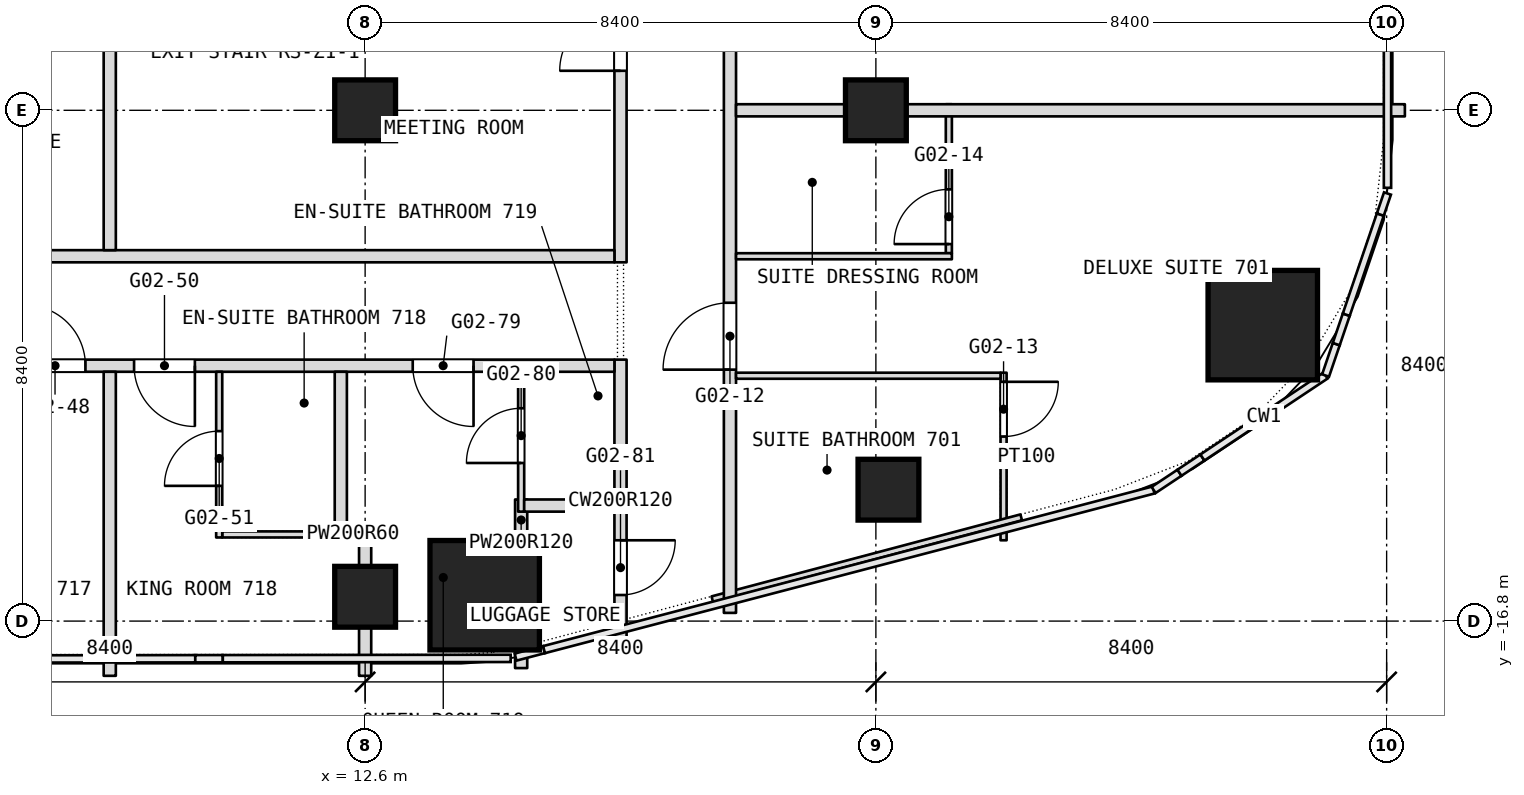
"""IFC4 building model, lengths in metres.
Left out: names, types, materials, properties, quantities, classifications, styles, units other than length and angle.
Written with IfcOpenShell. Run it as: python <this file> out.ifc"""

import sys

from ifc_helpers import new_model, si_unit, direction, frame, frame_2d, origin, origin_2d, place, context, subcontext, project, spatial, rectangle, extrude, element, fill, save


model = new_model("IFC4")
c1 = context("Model", 3, precision=1e-05, world=origin(), true_north=direction((0.0, 1.0)))
c2 = subcontext(c1, "Body", "Model", "MODEL_VIEW")
j1 = project(units=[si_unit("LENGTHUNIT", "METRE"), si_unit("PLANEANGLEUNIT", "RADIAN")], contexts=[c1])
p1 = place(None, origin())
s1 = spatial("IfcSite", under=j1, at=p1, CompositionType="ELEMENT")
p2 = place(p1, origin())
s2 = spatial("IfcBuilding", under=s1, at=p2, CompositionType="ELEMENT")
p3 = place(p2, frame((0.0, 0.0, 40.1)))
s3 = spatial("IfcBuildingStorey", under=s2, at=p3, CompositionType="ELEMENT", Elevation=40.1)
for number, where, z_axis, x_axis in (
    (1, (14.566, -16.375, 0.0), (0.0, 0.0, 1.0), (1.0, 0.0, 0.0)),
    (2, (27.363, -11.933, 0.0), (0.0, 0.0, 1.0), (1.0, 0.0, 0.0)),
):
    element("IfcColumn", number, at=place(p3, frame(where, z_axis=z_axis, x_axis=x_axis)), inside=s3, PredefinedType="COLUMN", context=c2, shape_type="SweptSolid", body=[
        extrude(rectangle(XDim=1.8, YDim=1.8, at=origin_2d()), origin(), (0.0, 0.0, 1.0), 3.6),
    ])
for number, where, z_axis, x_axis in (
    (3, (12.6, -8.4, 0.0), (0.0, 0.0, 1.0), (1.0, 0.0, 0.0)),
    (4, (21.0, -8.4, 0.0), (0.0, 0.0, 1.0), (1.0, 0.0, 0.0)),
    (5, (21.207, -14.639, 0.0), (0.0, 0.0, 1.0), (1.0, 0.0, 0.0)),
    (6, (12.6, -16.4, 0.0), (0.0, 0.0, 1.0), (1.0, 0.0, 0.0)),
):
    element("IfcColumn", number, at=place(p3, frame(where, z_axis=z_axis, x_axis=x_axis)), inside=s3, PredefinedType="COLUMN", context=c2, shape_type="SweptSolid", body=[
        extrude(rectangle(XDim=1.0, YDim=1.0, at=origin_2d()), origin(), (0.0, 0.0, 1.0), 3.6),
    ])
p4 = place(p3, frame((23.1, -15.471, 0.0), z_axis=(0.0, 0.0, 1.0), x_axis=(0.0, 1.0, 0.0)))
e7 = element("IfcWall", 7, at=p4, inside=s3, PredefinedType="PARTITIONING", context=c2, shape_type="SweptSolid", body=[
    extrude(rectangle(XDim=2.756, YDim=0.1, at=frame_2d((1.378, 0.0))), origin(), (0.0, 0.0, 1.0), 3.34),
])
p5 = place(p4, frame((1.706, 0.0, 0.0)))
e8 = element("IfcOpeningElement", 8, at=p5, cuts=e7, PredefinedType="OPENING", context=c2, shape_type="SweptSolid", body=[
    extrude(rectangle(XDim=0.9, YDim=2.1, at=frame_2d((0.45, 1.05))), frame((0.0, 0.05, 0.0), z_axis=(0.0, -1.0, 0.0), x_axis=(1.0, 0.0, 0.0)), (0.0, 0.0, 1.0), 0.1),
])
p6 = place(p3, frame((22.2, -10.75, 0.0), z_axis=(0.0, 0.0, 1.0), x_axis=(0.0, 1.0, 0.0)))
e9 = element("IfcWall", 9, at=p6, inside=s3, PredefinedType="PARTITIONING", context=c2, shape_type="SweptSolid", body=[
    extrude(rectangle(XDim=2.45, YDim=0.1, at=frame_2d((1.225, 0.0))), origin(), (0.0, 0.0, 1.0), 3.34),
])
p7 = place(p6, frame((0.15, 0.0, 0.0)))
e10 = element("IfcOpeningElement", 10, at=p7, cuts=e9, PredefinedType="OPENING", context=c2, shape_type="SweptSolid", body=[
    extrude(rectangle(XDim=0.9, YDim=2.1, at=frame_2d((0.45, 1.05))), frame((0.0, 0.05, 0.0), z_axis=(0.0, -1.0, 0.0), x_axis=(1.0, 0.0, 0.0)), (0.0, 0.0, 1.0), 0.1),
])
p8 = place(p3, frame((18.31, -16.442, 0.0), z_axis=(0.0, 0.0, 1.0), x_axis=(0.966552628131, 0.256468354876, 0.0)))
e11 = element("IfcWall", 11, at=p8, inside=s3, PredefinedType="PARTITIONING", context=c2, shape_type="SweptSolid", body=[
    extrude(rectangle(XDim=5.256, YDim=0.1, at=frame_2d((2.628, 0.0))), origin(), (0.0, 0.0, 1.0), 3.34),
])
p9 = place(p3, frame((18.6, -16.665, 0.0), z_axis=(0.0, 0.0, 1.0), x_axis=(0.0, 1.0, 0.0)))
e12 = element("IfcWall", 12, at=p9, inside=s3, PredefinedType="PARTITIONING", context=c2, shape_type="SweptSolid", body=[
    extrude(rectangle(XDim=50.205, YDim=0.2, at=frame_2d((25.103, 0.0))), origin(), (0.0, 0.0, 1.0), 3.34),
])
p10 = place(p9, frame((4.0, 0.0, 0.0)))
e13 = element("IfcOpeningElement", 13, at=p10, cuts=e12, PredefinedType="OPENING", context=c2, shape_type="SweptSolid", body=[
    extrude(rectangle(XDim=1.1, YDim=2.1, at=frame_2d((0.55, 1.05))), frame((0.0, 0.1, 0.0), z_axis=(0.0, -1.0, 0.0), x_axis=(1.0, 0.0, 0.0)), (0.0, 0.0, 1.0), 0.2),
])
p11 = place(p9, frame((9.815, 0.0, 0.0)))
e14 = element("IfcOpeningElement", 14, at=p11, cuts=e12, PredefinedType="OPENING", context=c2, shape_type="SweptSolid", body=[
    extrude(rectangle(XDim=1.1, YDim=2.1, at=frame_2d((0.55, 1.05))), frame((0.0, 0.1, 0.0), z_axis=(0.0, -1.0, 0.0), x_axis=(1.0, 0.0, 0.0)), (0.0, 0.0, 1.0), 0.2),
])
p12 = place(p9, frame((19.965, 0.0, 0.0)))
e15 = element("IfcOpeningElement", 15, at=p12, cuts=e12, PredefinedType="OPENING", context=c2, shape_type="SweptSolid", body=[
    extrude(rectangle(XDim=1.8, YDim=2.1, at=frame_2d((0.9, 1.05))), frame((0.0, 0.1, 0.0), z_axis=(0.0, -1.0, 0.0), x_axis=(1.0, 0.0, 0.0)), (0.0, 0.0, 1.0), 0.2),
])
p13 = place(p9, frame((25.465, 0.0, 0.0)))
e16 = element("IfcOpeningElement", 16, at=p13, cuts=e12, PredefinedType="OPENING", context=c2, shape_type="SweptSolid", body=[
    extrude(rectangle(XDim=1.0, YDim=2.1, at=frame_2d((0.5, 1.05))), frame((0.0, 0.1, 0.0), z_axis=(0.0, -1.0, 0.0), x_axis=(1.0, 0.0, 0.0)), (0.0, 0.0, 1.0), 0.2),
])
p14 = place(p9, frame((32.065, 0.0, 0.0)))
e17 = element("IfcOpeningElement", 17, at=p14, cuts=e12, PredefinedType="OPENING", context=c2, shape_type="SweptSolid", body=[
    extrude(rectangle(XDim=1.0, YDim=2.1, at=frame_2d((0.5, 1.05))), frame((0.0, 0.1, 0.0), z_axis=(0.0, -1.0, 0.0), x_axis=(1.0, 0.0, 0.0)), (0.0, 0.0, 1.0), 0.2),
])
p15 = place(p9, frame((37.165, 0.0, 0.0)))
e18 = element("IfcOpeningElement", 18, at=p15, cuts=e12, PredefinedType="OPENING", context=c2, shape_type="SweptSolid", body=[
    extrude(rectangle(XDim=1.1, YDim=2.1, at=frame_2d((0.55, 1.05))), frame((0.0, 0.1, 0.0), z_axis=(0.0, -1.0, 0.0), x_axis=(1.0, 0.0, 0.0)), (0.0, 0.0, 1.0), 0.2),
])
p16 = place(p9, frame((42.265, 0.0, 0.0)))
e19 = element("IfcOpeningElement", 19, at=p16, cuts=e12, PredefinedType="OPENING", context=c2, shape_type="SweptSolid", body=[
    extrude(rectangle(XDim=1.0, YDim=2.1, at=frame_2d((0.5, 1.05))), frame((0.0, 0.1, 0.0), z_axis=(0.0, -1.0, 0.0), x_axis=(1.0, 0.0, 0.0)), (0.0, 0.0, 1.0), 0.2),
])
p17 = place(p9, frame((46.865, 0.0, 0.0)))
e20 = element("IfcOpeningElement", 20, at=p17, cuts=e12, PredefinedType="OPENING", context=c2, shape_type="SweptSolid", body=[
    extrude(rectangle(XDim=1.0, YDim=2.1, at=frame_2d((0.5, 1.05))), frame((0.0, 0.1, 0.0), z_axis=(0.0, -1.0, 0.0), x_axis=(1.0, 0.0, 0.0)), (0.0, 0.0, 1.0), 0.2),
])
p18 = place(p3, frame((16.8, -17.143, 0.0), z_axis=(0.0, 0.0, 1.0), x_axis=(0.0, 1.0, 0.0)))
e21 = element("IfcWall", 21, at=p18, inside=s3, PredefinedType="PARTITIONING", context=c2, shape_type="SweptSolid", body=[
    extrude(rectangle(XDim=4.643, YDim=0.2, at=frame_2d((2.322, 0.0))), origin(), (0.0, 0.0, 1.0), 3.34),
])
p19 = place(p18, frame((0.772, 0.0, 0.0)))
e22 = element("IfcOpeningElement", 22, at=p19, cuts=e21, PredefinedType="OPENING", context=c2, shape_type="SweptSolid", body=[
    extrude(rectangle(XDim=0.9, YDim=2.1, at=frame_2d((0.45, 1.05))), frame((0.0, 0.1, 0.0), z_axis=(0.0, -1.0, 0.0), x_axis=(1.0, 0.0, 0.0)), (0.0, 0.0, 1.0), 0.2),
])
p20 = place(p3, frame((16.8, -10.9, 0.0), z_axis=(0.0, 0.0, 1.0), x_axis=(0.0, 1.0, 0.0)))
e23 = element("IfcWall", 23, at=p20, inside=s3, PredefinedType="PARTITIONING", context=c2, shape_type="SweptSolid", body=[
    extrude(rectangle(XDim=7.3, YDim=0.2, at=frame_2d((3.65, 0.0))), origin(), (0.0, 0.0, 1.0), 3.34),
])
p21 = place(p20, frame((3.15, 0.0, 0.0)))
e24 = element("IfcOpeningElement", 24, at=p21, cuts=e23, PredefinedType="OPENING", context=c2, shape_type="SweptSolid", body=[
    extrude(rectangle(XDim=1.0, YDim=2.1, at=frame_2d((0.5, 1.05))), frame((0.0, 0.1, 0.0), z_axis=(0.0, -1.0, 0.0), x_axis=(1.0, 0.0, 0.0)), (0.0, 0.0, 1.0), 0.2),
])
p22 = place(p3, frame((12.1, -15.375, 0.0), z_axis=(0.0, 0.0, 1.0), x_axis=(1.0, 0.0, 0.0)))
e25 = element("IfcWall", 25, at=p22, inside=s3, PredefinedType="PARTITIONING", context=c2, shape_type="SweptSolid", body=[
    extrude(rectangle(XDim=0.6, YDim=0.2, at=frame_2d((0.3, 0.0))), origin(), (0.0, 0.0, 1.0), 3.34),
])
p23 = place(p3, frame((10.25, -15.375, 0.0), z_axis=(0.0, 0.0, 1.0), x_axis=(1.0, 0.0, 0.0)))
e26 = element("IfcWall", 26, at=p23, inside=s3, PredefinedType="PARTITIONING", context=c2, shape_type="SweptSolid", body=[
    extrude(rectangle(XDim=2.05, YDim=0.1, at=frame_2d((1.025, 0.0))), origin(), (0.0, 0.0, 1.0), 3.34),
])
p24 = place(p3, frame((15.166, -17.573, 0.0), z_axis=(0.0, 0.0, 1.0), x_axis=(0.0, 1.0, 0.0)))
e27 = element("IfcWall", 27, at=p24, inside=s3, PredefinedType="PARTITIONING", context=c2, shape_type="SweptSolid", body=[
    extrude(rectangle(XDim=0.298, YDim=0.2, at=frame_2d((0.149, 0.0))), origin(), (0.0, 0.0, 1.0), 3.34),
])
p25 = place(p3, frame((15.166, -15.475, 0.0), z_axis=(0.0, 0.0, 1.0), x_axis=(0.0, 1.0, 0.0)))
e28 = element("IfcWall", 28, at=p25, inside=s3, PredefinedType="PARTITIONING", context=c2, shape_type="SweptSolid", body=[
    extrude(rectangle(XDim=0.675, YDim=0.2, at=frame_2d((0.337, 0.0))), origin(), (0.0, 0.0, 1.0), 3.34),
])
p26 = place(p3, frame((15.166, -15.0, 0.0), z_axis=(0.0, 0.0, 1.0), x_axis=(0.0, 1.0, 0.0)))
e29 = element("IfcWall", 29, at=p26, inside=s3, PredefinedType="PARTITIONING", context=c2, shape_type="SweptSolid", body=[
    extrude(rectangle(XDim=2.3, YDim=0.1, at=frame_2d((1.15, 0.0))), origin(), (0.0, 0.0, 1.0), 3.34),
])
p27 = place(p26, frame((0.8, 0.0, 0.0)))
e30 = element("IfcOpeningElement", 30, at=p27, cuts=e29, PredefinedType="OPENING", context=c2, shape_type="SweptSolid", body=[
    extrude(rectangle(XDim=0.9, YDim=2.1, at=frame_2d((0.45, 1.05))), frame((0.0, 0.05, 0.0), z_axis=(0.0, -1.0, 0.0), x_axis=(1.0, 0.0, 0.0)), (0.0, 0.0, 1.0), 0.1),
])
p28 = place(p3, frame((15.216, -14.9, 0.0), z_axis=(0.0, 0.0, 1.0), x_axis=(1.0, 0.0, 0.0)))
e31 = element("IfcWall", 31, at=p28, inside=s3, PredefinedType="PARTITIONING", context=c2, shape_type="SweptSolid", body=[
    extrude(rectangle(XDim=1.484, YDim=0.2, at=frame_2d((0.742, 0.0))), origin(), (0.0, 0.0, 1.0), 3.34),
])
p29 = place(p3, frame((18.7, -12.765, 0.0), z_axis=(0.0, 0.0, 1.0), x_axis=(1.0, 0.0, 0.0)))
e32 = element("IfcWall", 32, at=p29, inside=s3, PredefinedType="PARTITIONING", context=c2, shape_type="SweptSolid", body=[
    extrude(rectangle(XDim=4.35, YDim=0.1, at=frame_2d((2.175, 0.0))), origin(), (0.0, 0.0, 1.0), 3.34),
])
p30 = place(p3, frame((12.6, -17.7, 0.0), z_axis=(0.0, 0.0, 1.0), x_axis=(0.0, 1.0, 0.0)))
e33 = element("IfcWall", 33, at=p30, inside=s3, PredefinedType="PARTITIONING", context=c2, shape_type="SweptSolid", body=[
    extrude(rectangle(XDim=2.225, YDim=0.2, at=frame_2d((1.112, 0.0))), origin(), (0.0, 0.0, 1.0), 3.34),
])
p31 = place(p3, frame((-16.7, -12.6, 0.0), z_axis=(0.0, 0.0, 1.0), x_axis=(1.0, 0.0, 0.0)))
e34 = element("IfcWall", 34, at=p31, inside=s3, PredefinedType="PARTITIONING", context=c2, shape_type="SweptSolid", body=[
    extrude(rectangle(XDim=33.4, YDim=0.2, at=frame_2d((16.7, 0.0))), origin(), (0.0, 0.0, 1.0), 3.34),
])
p32 = place(p31, frame((6.9, 0.0, 0.0)))
e35 = element("IfcOpeningElement", 35, at=p32, cuts=e34, PredefinedType="OPENING", context=c2, shape_type="SweptSolid", body=[
    extrude(rectangle(XDim=1.0, YDim=2.1, at=frame_2d((0.5, 1.05))), frame((0.0, 0.1, 0.0), z_axis=(0.0, -1.0, 0.0), x_axis=(1.0, 0.0, 0.0)), (0.0, 0.0, 1.0), 0.2),
])
p33 = place(p31, frame((8.7, 0.0, 0.0)))
e36 = element("IfcOpeningElement", 36, at=p33, cuts=e34, PredefinedType="OPENING", context=c2, shape_type="SweptSolid", body=[
    extrude(rectangle(XDim=1.0, YDim=2.1, at=frame_2d((0.5, 1.05))), frame((0.0, 0.1, 0.0), z_axis=(0.0, -1.0, 0.0), x_axis=(1.0, 0.0, 0.0)), (0.0, 0.0, 1.0), 0.2),
])
p34 = place(p31, frame((12.9, 0.0, 0.0)))
e37 = element("IfcOpeningElement", 37, at=p34, cuts=e34, PredefinedType="OPENING", context=c2, shape_type="SweptSolid", body=[
    extrude(rectangle(XDim=1.0, YDim=2.1, at=frame_2d((0.5, 1.05))), frame((0.0, 0.1, 0.0), z_axis=(0.0, -1.0, 0.0), x_axis=(1.0, 0.0, 0.0)), (0.0, 0.0, 1.0), 0.2),
])
p35 = place(p31, frame((19.5, 0.0, 0.0)))
e38 = element("IfcOpeningElement", 38, at=p35, cuts=e34, PredefinedType="OPENING", context=c2, shape_type="SweptSolid", body=[
    extrude(rectangle(XDim=1.0, YDim=2.1, at=frame_2d((0.5, 1.05))), frame((0.0, 0.1, 0.0), z_axis=(0.0, -1.0, 0.0), x_axis=(1.0, 0.0, 0.0)), (0.0, 0.0, 1.0), 0.2),
])
p36 = place(p31, frame((23.7, 0.0, 0.0)))
e39 = element("IfcOpeningElement", 39, at=p36, cuts=e34, PredefinedType="OPENING", context=c2, shape_type="SweptSolid", body=[
    extrude(rectangle(XDim=1.0, YDim=2.1, at=frame_2d((0.5, 1.05))), frame((0.0, 0.1, 0.0), z_axis=(0.0, -1.0, 0.0), x_axis=(1.0, 0.0, 0.0)), (0.0, 0.0, 1.0), 0.2),
])
p37 = place(p31, frame((25.5, 0.0, 0.0)))
e40 = element("IfcOpeningElement", 40, at=p37, cuts=e34, PredefinedType="OPENING", context=c2, shape_type="SweptSolid", body=[
    extrude(rectangle(XDim=1.0, YDim=2.1, at=frame_2d((0.5, 1.05))), frame((0.0, 0.1, 0.0), z_axis=(0.0, -1.0, 0.0), x_axis=(1.0, 0.0, 0.0)), (0.0, 0.0, 1.0), 0.2),
])
p38 = place(p31, frame((2.317, 0.0, 0.0)))
e41 = element("IfcOpeningElement", 41, at=p38, cuts=e34, PredefinedType="OPENING", context=c2, shape_type="SweptSolid", body=[
    extrude(rectangle(XDim=1.0, YDim=2.1, at=frame_2d((0.5, 1.05))), frame((0.0, 0.1, 0.0), z_axis=(0.0, -1.0, 0.0), x_axis=(1.0, 0.0, 0.0)), (0.0, 0.0, 1.0), 0.2),
])
p39 = place(p31, frame((30.083, 0.0, 0.0)))
e42 = element("IfcOpeningElement", 42, at=p39, cuts=e34, PredefinedType="OPENING", context=c2, shape_type="SweptSolid", body=[
    extrude(rectangle(XDim=1.0, YDim=2.1, at=frame_2d((0.5, 1.05))), frame((0.0, 0.1, 0.0), z_axis=(0.0, -1.0, 0.0), x_axis=(1.0, 0.0, 0.0)), (0.0, 0.0, 1.0), 0.2),
])
p40 = place(p3, frame((12.2, -15.325, 0.0), z_axis=(0.0, 0.0, 1.0), x_axis=(0.0, 1.0, 0.0)))
e43 = element("IfcWall", 43, at=p40, inside=s3, PredefinedType="PARTITIONING", context=c2, shape_type="SweptSolid", body=[
    extrude(rectangle(XDim=2.625, YDim=0.2, at=frame_2d((1.312, 0.0))), origin(), (0.0, 0.0, 1.0), 3.34),
])
p41 = place(p3, frame((18.7, -10.8, 0.0), z_axis=(0.0, 0.0, 1.0), x_axis=(1.0, 0.0, 0.0)))
e44 = element("IfcWall", 44, at=p41, inside=s3, PredefinedType="PARTITIONING", context=c2, shape_type="SweptSolid", body=[
    extrude(rectangle(XDim=3.55, YDim=0.1, at=frame_2d((1.775, 0.0))), origin(), (0.0, 0.0, 1.0), 3.34),
])
p42 = place(p3, frame((-4.1, -10.8, 0.0), z_axis=(0.0, 0.0, 1.0), x_axis=(1.0, 0.0, 0.0)))
e45 = element("IfcWall", 45, at=p42, inside=s3, PredefinedType="PARTITIONING", context=c2, shape_type="SweptSolid", body=[
    extrude(rectangle(XDim=20.8, YDim=0.2, at=frame_2d((10.4, 0.0))), origin(), (0.0, 0.0, 1.0), 3.34),
])
p43 = place(p3, frame((10.2, -15.425, 0.0), z_axis=(0.0, 0.0, 1.0), x_axis=(0.0, 1.0, 0.0)))
e46 = element("IfcWall", 46, at=p43, inside=s3, PredefinedType="PARTITIONING", context=c2, shape_type="SweptSolid", body=[
    extrude(rectangle(XDim=2.725, YDim=0.1, at=frame_2d((1.363, 0.0))), origin(), (0.0, 0.0, 1.0), 3.34),
])
p44 = place(p43, frame((0.849, 0.0, 0.0)))
e47 = element("IfcOpeningElement", 47, at=p44, cuts=e46, PredefinedType="OPENING", context=c2, shape_type="SweptSolid", body=[
    extrude(rectangle(XDim=0.9, YDim=2.1, at=frame_2d((0.45, 1.05))), frame((0.0, 0.05, 0.0), z_axis=(0.0, -1.0, 0.0), x_axis=(1.0, 0.0, 0.0)), (0.0, 0.0, 1.0), 0.1),
])
p45 = place(p3, frame((8.4, -17.7, 0.0), z_axis=(0.0, 0.0, 1.0), x_axis=(0.0, 1.0, 0.0)))
e48 = element("IfcWall", 48, at=p45, inside=s3, PredefinedType="PARTITIONING", context=c2, shape_type="SweptSolid", body=[
    extrude(rectangle(XDim=5.0, YDim=0.2, at=frame_2d((2.5, 0.0))), origin(), (0.0, 0.0, 1.0), 3.34),
])
p46 = place(p3, frame((8.4, -10.7, 0.0), z_axis=(0.0, 0.0, 1.0), x_axis=(0.0, 1.0, 0.0)))
e49 = element("IfcWall", 49, at=p46, inside=s3, PredefinedType="PARTITIONING", context=c2, shape_type="SweptSolid", body=[
    extrude(rectangle(XDim=3.6, YDim=0.2, at=frame_2d((1.8, 0.0))), origin(), (0.0, 0.0, 1.0), 3.34),
])
p47 = place(p3, frame((18.7, -8.4, 0.0), z_axis=(0.0, 0.0, 1.0), x_axis=(1.0, 0.0, 0.0)))
e50 = element("IfcWall", 50, at=p47, inside=s3, PredefinedType="PARTITIONING", context=c2, shape_type="SweptSolid", body=[
    extrude(rectangle(XDim=11.0, YDim=0.2, at=frame_2d((5.5, 0.0))), origin(), (0.0, 0.0, 1.0), 2.84),
])
p48 = place(p5, origin())
e51 = element("IfcDoor", 51, at=p48, inside=s3, OperationType="SINGLE_SWING_RIGHT", PredefinedType="DOOR", context=c2, shape_type="SweptSolid", body=[
    extrude(rectangle(XDim=0.9, YDim=2.1, at=frame_2d((0.45, 1.05))), frame((0.0, 0.025, 0.0), z_axis=(0.0, -1.0, 0.0), x_axis=(1.0, 0.0, 0.0)), (0.0, 0.0, 1.0), 0.05),
])
fill(e8, e51)
p49 = place(p7, origin())
e52 = element("IfcDoor", 52, at=p49, inside=s3, OperationType="SINGLE_SWING_LEFT", PredefinedType="DOOR", context=c2, shape_type="SweptSolid", body=[
    extrude(rectangle(XDim=0.9, YDim=2.1, at=frame_2d((0.45, 1.05))), frame((0.0, 0.025, 0.0), z_axis=(0.0, -1.0, 0.0), x_axis=(1.0, 0.0, 0.0)), (0.0, 0.0, 1.0), 0.05),
])
fill(e10, e52)
p50 = place(p10, origin())
e53 = element("IfcDoor", 53, at=p50, inside=s3, OperationType="SINGLE_SWING_RIGHT", PredefinedType="DOOR", context=c2, shape_type="SweptSolid", body=[
    extrude(rectangle(XDim=1.1, YDim=2.1, at=frame_2d((0.55, 1.05))), frame((0.0, 0.025, 0.0), z_axis=(0.0, -1.0, 0.0), x_axis=(1.0, 0.0, 0.0)), (0.0, 0.0, 1.0), 0.05),
])
fill(e13, e53)
p51 = place(p19, origin())
e54 = element("IfcDoor", 54, at=p51, inside=s3, OperationType="SINGLE_SWING_RIGHT", PredefinedType="DOOR", context=c2, shape_type="SweptSolid", body=[
    extrude(rectangle(XDim=0.9, YDim=2.1, at=frame_2d((0.45, 1.05))), frame((0.0, 0.025, 0.0), z_axis=(0.0, -1.0, 0.0), x_axis=(1.0, 0.0, 0.0)), (0.0, 0.0, 1.0), 0.05),
])
fill(e22, e54)
p52 = place(p21, origin())
e55 = element("IfcDoor", 55, at=p52, inside=s3, OperationType="SINGLE_SWING_RIGHT", PredefinedType="DOOR", context=c2, shape_type="SweptSolid", body=[
    extrude(rectangle(XDim=1.0, YDim=2.1, at=frame_2d((0.5, 1.05))), frame((0.0, 0.025, 0.0), z_axis=(0.0, -1.0, 0.0), x_axis=(1.0, 0.0, 0.0)), (0.0, 0.0, 1.0), 0.05),
])
fill(e24, e55)
p53 = place(p27, origin())
e56 = element("IfcDoor", 56, at=p53, inside=s3, OperationType="SINGLE_SWING_RIGHT", PredefinedType="DOOR", context=c2, shape_type="SweptSolid", body=[
    extrude(rectangle(XDim=0.9, YDim=2.1, at=frame_2d((0.45, 1.05))), frame((0.0, 0.025, 0.0), z_axis=(0.0, -1.0, 0.0), x_axis=(1.0, 0.0, 0.0)), (0.0, 0.0, 1.0), 0.05),
])
fill(e30, e56)
p54 = place(p36, origin())
e57 = element("IfcDoor", 57, at=p54, inside=s3, OperationType="SINGLE_SWING_RIGHT", PredefinedType="DOOR", context=c2, shape_type="SweptSolid", body=[
    extrude(rectangle(XDim=1.0, YDim=2.1, at=frame_2d((0.5, 1.05))), frame((0.0, 0.025, 0.0), z_axis=(0.0, -1.0, 0.0), x_axis=(1.0, 0.0, 0.0)), (0.0, 0.0, 1.0), 0.05),
])
fill(e39, e57)
p55 = place(p37, origin())
e58 = element("IfcDoor", 58, at=p55, inside=s3, OperationType="SINGLE_SWING_RIGHT", PredefinedType="DOOR", context=c2, shape_type="SweptSolid", body=[
    extrude(rectangle(XDim=1.0, YDim=2.1, at=frame_2d((0.5, 1.05))), frame((0.0, 0.025, 0.0), z_axis=(0.0, -1.0, 0.0), x_axis=(1.0, 0.0, 0.0)), (0.0, 0.0, 1.0), 0.05),
])
fill(e40, e58)
p56 = place(p39, origin())
e59 = element("IfcDoor", 59, at=p56, inside=s3, OperationType="SINGLE_SWING_LEFT", PredefinedType="DOOR", context=c2, shape_type="SweptSolid", body=[
    extrude(rectangle(XDim=1.0, YDim=2.1, at=frame_2d((0.5, 1.05))), frame((0.0, 0.025, 0.0), z_axis=(0.0, -1.0, 0.0), x_axis=(1.0, 0.0, 0.0)), (0.0, 0.0, 1.0), 0.05),
])
fill(e42, e59)
p57 = place(p44, origin())
e60 = element("IfcDoor", 60, at=p57, inside=s3, OperationType="SINGLE_SWING_RIGHT", PredefinedType="DOOR", context=c2, shape_type="SweptSolid", body=[
    extrude(rectangle(XDim=0.9, YDim=2.1, at=frame_2d((0.45, 1.05))), frame((0.0, 0.025, 0.0), z_axis=(0.0, -1.0, 0.0), x_axis=(1.0, 0.0, 0.0)), (0.0, 0.0, 1.0), 0.05),
])
fill(e47, e60)
save(model, sys.argv[1])
